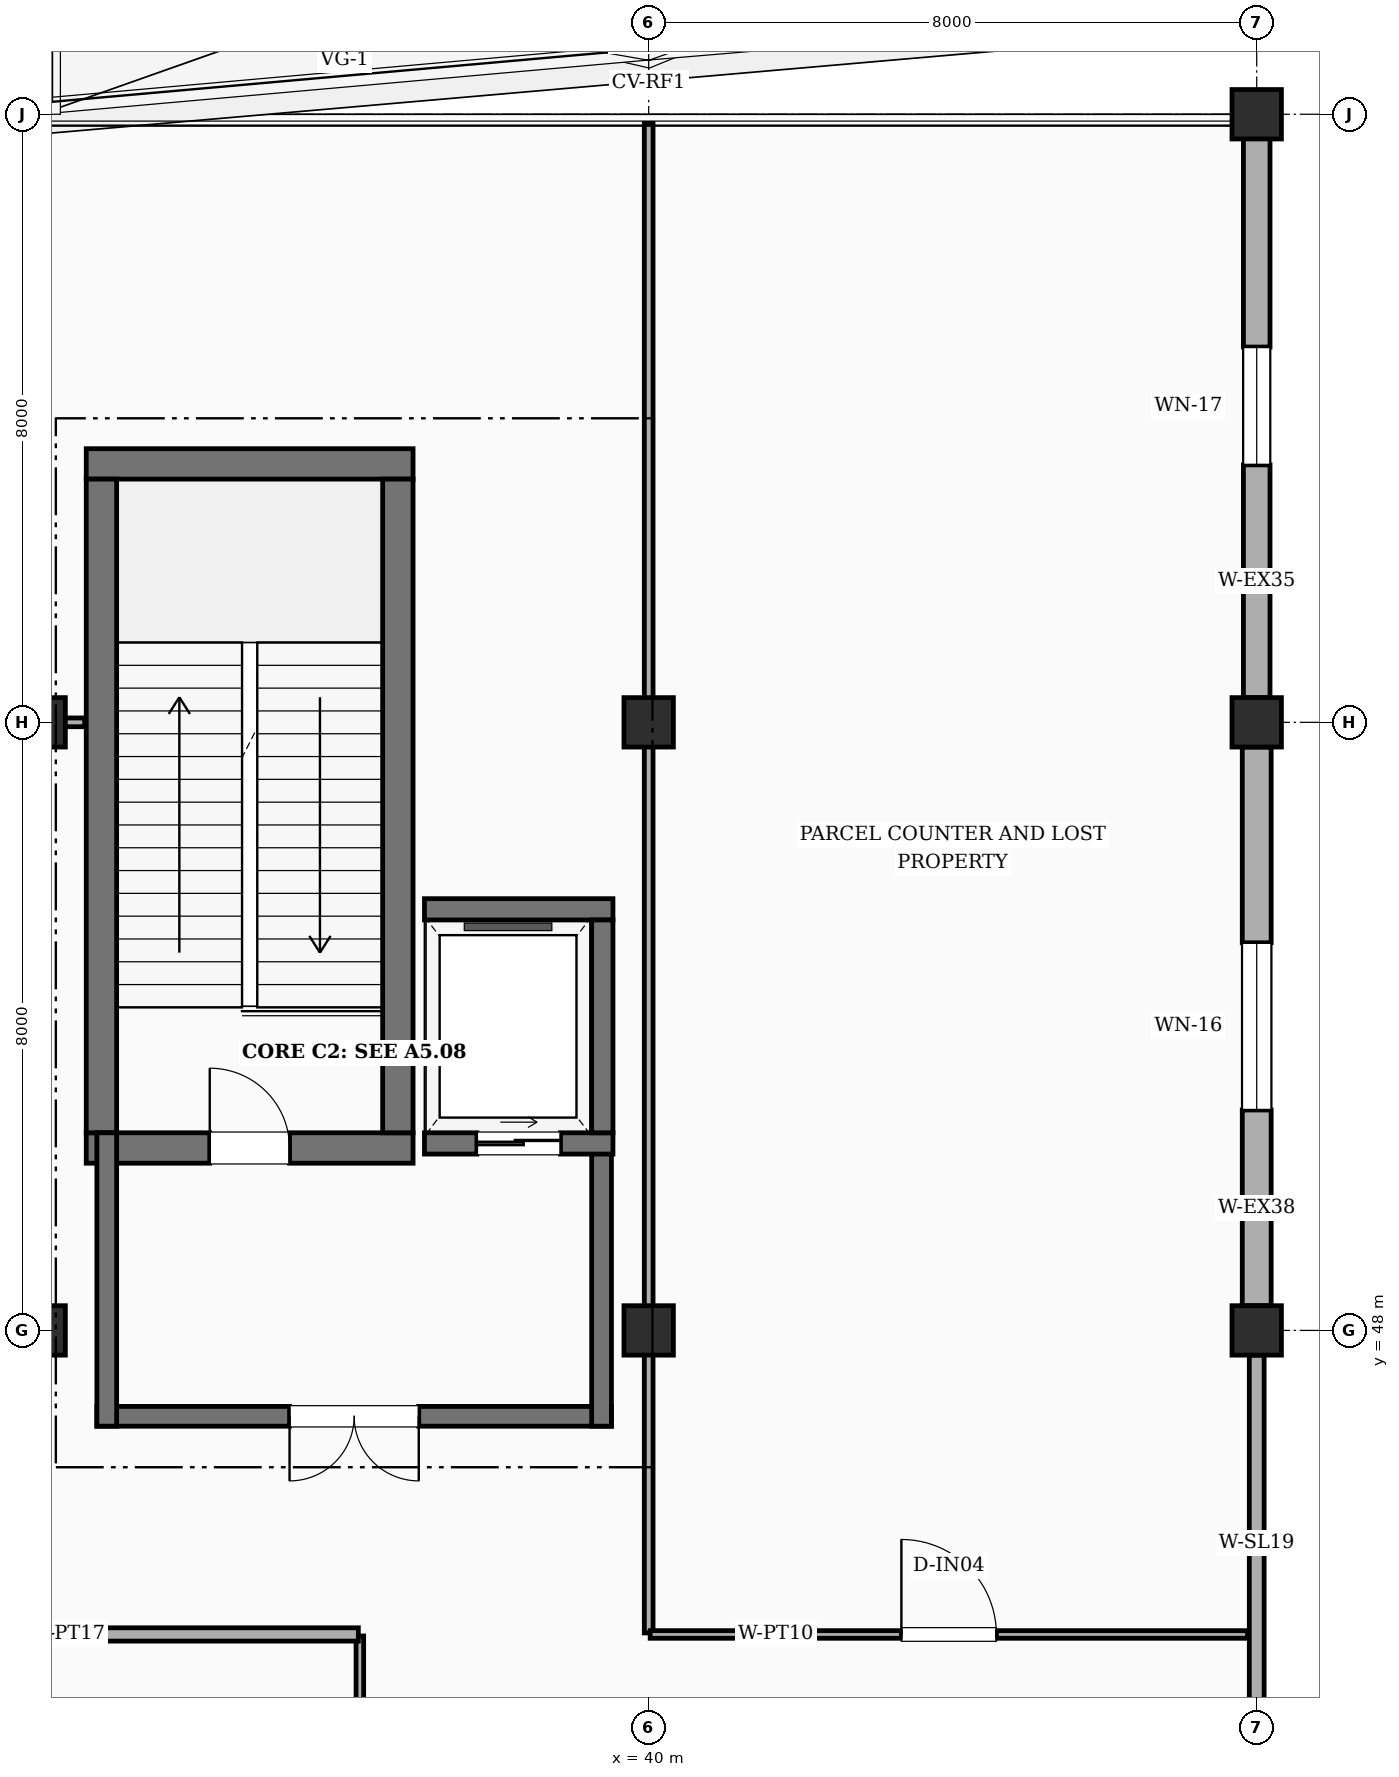
"""IFC4 building model, lengths in metres.
Left out: names, types, materials, properties, quantities, classifications, styles, units other than length and angle.
Written with IfcOpenShell. Run it as: python <this file> out.ifc"""

import sys

from ifc_helpers import new_model, si_unit, direction, frame, frame_2d, origin, origin_2d, place, context, subcontext, project, spatial, rectangle, extrude, element, fill, save


model = new_model("IFC4")
c1 = context("Model", 3, precision=1e-05, world=origin(), true_north=direction((0.0, 1.0)))
c2 = subcontext(c1, "Body", "Model", "MODEL_VIEW")
j1 = project(units=[si_unit("LENGTHUNIT", "METRE"), si_unit("PLANEANGLEUNIT", "RADIAN")], contexts=[c1])
p1 = place(None, origin())
s1 = spatial("IfcSite", under=j1, at=p1, CompositionType="ELEMENT")
p2 = place(p1, origin())
s2 = spatial("IfcBuilding", under=s1, at=p2, CompositionType="ELEMENT")
p3 = place(p2, frame((0.0, 0.0, 10.8)))
s3 = spatial("IfcBuildingStorey", under=s2, at=p3, CompositionType="ELEMENT", Elevation=10.8)
for number, where, z_axis, x_axis in (
    (1, (32.0, 48.0, 0.0), (0.0, 0.0, 1.0), (1.0, 0.0, 0.0)),
    (2, (32.0, 56.0, 0.0), (0.0, 0.0, 1.0), (1.0, 0.0, 0.0)),
    (3, (40.0, 48.0, 0.0), (0.0, 0.0, 1.0), (1.0, 0.0, 0.0)),
    (4, (40.0, 56.0, 0.0), (0.0, 0.0, 1.0), (1.0, 0.0, 0.0)),
    (5, (48.0, 48.0, 0.0), (0.0, 0.0, 1.0), (1.0, 0.0, 0.0)),
    (6, (48.0, 56.0, 0.0), (0.0, 0.0, 1.0), (1.0, 0.0, 0.0)),
    (7, (48.0, 64.0, 0.0), (0.0, 0.0, 1.0), (1.0, 0.0, 0.0)),
):
    element("IfcColumn", number, at=place(p3, frame(where, z_axis=z_axis, x_axis=x_axis)), inside=s3, PredefinedType="COLUMN", context=c2, shape_type="SweptSolid", body=[
        extrude(rectangle(XDim=0.65, YDim=0.65, at=origin_2d()), origin(), (0.0, 0.0, 1.0), 4.2),
    ])
p4 = place(p3, frame((48.0, 40.325, 0.0), z_axis=(0.0, 0.0, 1.0), x_axis=(0.0, 1.0, 0.0)))
e8 = element("IfcWall", 8, at=p4, inside=s3, PredefinedType="SOLIDWALL", context=c2, shape_type="SweptSolid", body=[
    extrude(rectangle(XDim=7.35, YDim=0.195, at=frame_2d((3.675, 0.0))), origin(), (0.0, 0.0, 1.0), 3.36),
])
p5 = place(p4, frame((0.85, 0.0, 0.95)))
e9 = element("IfcOpeningElement", 9, at=p5, cuts=e8, PredefinedType="OPENING", context=c2, shape_type="SweptSolid", body=[
    extrude(rectangle(XDim=1.55, YDim=1.75, at=frame_2d((0.775, 0.875))), frame((0.0, 0.107, 0.0), z_axis=(0.0, -1.0, 0.0), x_axis=(1.0, 0.0, 0.0)), (0.0, 0.0, 1.0), 0.215),
])
p6 = place(p3, frame((48.0, 48.325, 0.0), z_axis=(0.0, 0.0, 1.0), x_axis=(0.0, 1.0, 0.0)))
e10 = element("IfcWall", 10, at=p6, inside=s3, PredefinedType="STANDARD", context=c2, shape_type="SweptSolid", body=[
    extrude(rectangle(XDim=7.35, YDim=0.38, at=frame_2d((3.675, 0.0))), origin(), (0.0, 0.0, 1.0), 3.36),
])
p7 = place(p6, frame((2.575, 0.0, 0.95)))
e11 = element("IfcOpeningElement", 11, at=p7, cuts=e10, PredefinedType="OPENING", context=c2, shape_type="SweptSolid", body=[
    extrude(rectangle(XDim=2.2, YDim=1.75, at=frame_2d((1.1, 0.875))), frame((0.0, 0.2, 0.0), z_axis=(0.0, -1.0, 0.0), x_axis=(1.0, 0.0, 0.0)), (0.0, 0.0, 1.0), 0.4),
])
p8 = place(p3, frame((48.0, 56.325, 0.0), z_axis=(0.0, 0.0, 1.0), x_axis=(0.0, 1.0, 0.0)))
e12 = element("IfcWall", 12, at=p8, inside=s3, PredefinedType="STANDARD", context=c2, shape_type="SweptSolid", body=[
    extrude(rectangle(XDim=7.675, YDim=0.35, at=frame_2d((3.837, 0.0))), origin(), (0.0, 0.0, 1.0), 3.88),
])
p9 = place(p8, frame((3.062, 0.0, 0.95)))
e13 = element("IfcOpeningElement", 13, at=p9, cuts=e12, PredefinedType="OPENING", context=c2, shape_type="SweptSolid", body=[
    extrude(rectangle(XDim=1.55, YDim=1.75, at=frame_2d((0.775, 0.875))), frame((0.0, 0.185, 0.0), z_axis=(0.0, -1.0, 0.0), x_axis=(1.0, 0.0, 0.0)), (0.0, 0.0, 1.0), 0.37),
])
p10 = place(p3, frame((32.6, 50.4, 0.0), z_axis=(0.0, 0.0, 1.0), x_axis=(1.0, 0.0, 0.0)))
e14 = element("IfcWall", 14, at=p10, inside=s3, PredefinedType="SHEAR", context=c2, shape_type="SweptSolid", body=[
    extrude(rectangle(XDim=4.3, YDim=0.4, at=frame_2d((2.15, 0.0))), origin(), (0.0, 0.0, 1.0), 4.2),
])
p11 = place(p10, frame((1.625, 0.0, 0.0)))
e15 = element("IfcOpeningElement", 15, at=p11, cuts=e14, PredefinedType="OPENING", context=c2, shape_type="SweptSolid", body=[
    extrude(rectangle(XDim=1.05, YDim=2.15, at=frame_2d((0.525, 1.075))), frame((0.0, 0.21, 0.0), z_axis=(0.0, -1.0, 0.0), x_axis=(1.0, 0.0, 0.0)), (0.0, 0.0, 1.0), 0.42),
])
p12 = place(p3, frame((32.6, 59.4, 0.0), z_axis=(0.0, 0.0, 1.0), x_axis=(1.0, 0.0, 0.0)))
e16 = element("IfcWall", 16, at=p12, inside=s3, PredefinedType="SHEAR", context=c2, shape_type="SweptSolid", body=[
    extrude(rectangle(XDim=4.3, YDim=0.4, at=frame_2d((2.15, 0.0))), origin(), (0.0, 0.0, 1.0), 4.2),
])
for number, where, z_axis, x_axis in (
    (17, (32.8, 50.6, 0.0), (0.0, 0.0, 1.0), (0.0, 1.0, 0.0)),
    (18, (36.7, 50.6, 0.0), (0.0, 0.0, 1.0), (0.0, 1.0, 0.0)),
):
    element("IfcWall", number, at=place(p3, frame(where, z_axis=z_axis, x_axis=x_axis)), inside=s3, PredefinedType="SHEAR", context=c2, shape_type="SweptSolid", body=[
        extrude(rectangle(XDim=8.6, YDim=0.4, at=frame_2d((4.3, 0.0))), origin(), (0.0, 0.0, 1.0), 4.2),
    ])
p13 = place(p3, frame((39.51, 46.87, 0.0), z_axis=(0.0, 0.0, 1.0), x_axis=(-1.0, 0.0, 0.0)))
e19 = element("IfcWall", 19, at=p13, inside=s3, PredefinedType="SHEAR", context=c2, shape_type="SweptSolid", body=[
    extrude(rectangle(XDim=6.77, YDim=0.26, at=frame_2d((3.385, 0.0))), origin(), (0.0, 0.0, 1.0), 4.2),
])
p14 = place(p13, frame((2.535, 0.0, 0.0)))
e20 = element("IfcOpeningElement", 20, at=p14, cuts=e19, PredefinedType="OPENING", context=c2, shape_type="SweptSolid", body=[
    extrude(rectangle(XDim=1.7, YDim=2.2, at=frame_2d((0.85, 1.1))), frame((0.0, 0.14, 0.0), z_axis=(0.0, -1.0, 0.0), x_axis=(1.0, 0.0, 0.0)), (0.0, 0.0, 1.0), 0.28),
])
for number, where, z_axis, x_axis in (
    (21, (32.87, 46.74, 0.0), (0.0, 0.0, 1.0), (0.0, 1.0, 0.0)),
    (22, (39.38, 46.74, 0.0), (0.0, 0.0, 1.0), (0.0, 1.0, 0.0)),
):
    element("IfcWall", number, at=place(p3, frame(where, z_axis=z_axis, x_axis=x_axis)), inside=s3, PredefinedType="SHEAR", context=c2, shape_type="SweptSolid", body=[
        extrude(rectangle(XDim=3.86, YDim=0.26, at=frame_2d((1.93, 0.0))), origin(), (0.0, 0.0, 1.0), 4.2),
    ])
p15 = place(p3, frame((37.05, 50.46, 0.0), z_axis=(0.0, 0.0, 1.0), x_axis=(1.0, 0.0, 0.0)))
e23 = element("IfcWall", 23, at=p15, inside=s3, PredefinedType="SHEAR", context=c2, shape_type="SweptSolid", body=[
    extrude(rectangle(XDim=2.48, YDim=0.28, at=frame_2d((1.24, 0.0))), origin(), (0.0, 0.0, 1.0), 4.2),
])
p16 = place(p15, frame((0.69, 0.0, 0.0)))
e24 = element("IfcOpeningElement", 24, at=p16, cuts=e23, PredefinedType="OPENING", context=c2, shape_type="SweptSolid", body=[
    extrude(rectangle(XDim=1.1, YDim=2.15, at=frame_2d((0.55, 1.075))), frame((0.0, 0.15, 0.0), z_axis=(0.0, -1.0, 0.0), x_axis=(1.0, 0.0, 0.0)), (0.0, 0.0, 1.0), 0.3),
])
p17 = place(p3, frame((37.05, 53.54, 0.0), z_axis=(0.0, 0.0, 1.0), x_axis=(1.0, 0.0, 0.0)))
e25 = element("IfcWall", 25, at=p17, inside=s3, PredefinedType="SHEAR", context=c2, shape_type="SweptSolid", body=[
    extrude(rectangle(XDim=2.48, YDim=0.28, at=frame_2d((1.24, 0.0))), origin(), (0.0, 0.0, 1.0), 4.2),
])
p18 = place(p3, frame((39.39, 50.6, 0.0), z_axis=(0.0, 0.0, 1.0), x_axis=(0.0, 1.0, 0.0)))
e26 = element("IfcWall", 26, at=p18, inside=s3, PredefinedType="SHEAR", context=c2, shape_type="SweptSolid", body=[
    extrude(rectangle(XDim=2.8, YDim=0.28, at=frame_2d((1.4, 0.0))), origin(), (0.0, 0.0, 1.0), 4.2),
])
p19 = place(p3, frame((24.12, 56.0, 0.0), z_axis=(0.0, 0.0, 1.0), x_axis=(1.0, 0.0, 0.0)))
e27 = element("IfcWall", 27, at=p19, inside=s3, PredefinedType="PARTITIONING", context=c2, shape_type="SweptSolid", body=[
    extrude(rectangle(XDim=8.46, YDim=0.115, at=frame_2d((4.23, 0.0))), origin(), (0.0, 0.0, 1.0), 3.464),
])
p20 = place(p3, frame((36.2, 15.02, 0.0), z_axis=(0.0, 0.0, 1.0), x_axis=(0.0, 1.0, 0.0)))
e28 = element("IfcWall", 28, at=p20, inside=s3, PredefinedType="PARTITIONING", context=c2, shape_type="SweptSolid", body=[
    extrude(rectangle(XDim=28.96, YDim=0.1, at=frame_2d((14.48, 0.0))), origin(), (0.0, 0.0, 1.0), 3.88),
])
p21 = place(p20, frame((13.755, 0.0, 0.0)))
e29 = element("IfcOpeningElement", 29, at=p21, cuts=e28, PredefinedType="OPENING", context=c2, shape_type="SweptSolid", body=[
    extrude(rectangle(XDim=1.45, YDim=2.2, at=frame_2d((0.725, 1.1))), frame((0.0, 0.06, 0.0), z_axis=(0.0, -1.0, 0.0), x_axis=(1.0, 0.0, 0.0)), (0.0, 0.0, 1.0), 0.12),
])
p22 = place(p3, frame((28.52, 44.0, 0.0), z_axis=(0.0, 0.0, 1.0), x_axis=(1.0, 0.0, 0.0)))
e30 = element("IfcWall", 30, at=p22, inside=s3, PredefinedType="PARTITIONING", context=c2, shape_type="SweptSolid", body=[
    extrude(rectangle(XDim=7.66, YDim=0.175, at=frame_2d((3.83, 0.0))), origin(), (0.0, 0.0, 1.0), 3.36),
])
p23 = place(p3, frame((40.0, 44.02, 0.0), z_axis=(0.0, 0.0, 1.0), x_axis=(0.0, 1.0, 0.0)))
e31 = element("IfcWall", 31, at=p23, inside=s3, PredefinedType="PARTITIONING", context=c2, shape_type="SweptSolid", body=[
    extrude(rectangle(XDim=19.86, YDim=0.115, at=frame_2d((9.93, 0.0))), origin(), (0.0, 0.0, 1.0), 3.36),
])
p24 = place(p3, frame((40.02, 44.0, 0.0), z_axis=(0.0, 0.0, 1.0), x_axis=(1.0, 0.0, 0.0)))
e32 = element("IfcWall", 32, at=p24, inside=s3, PredefinedType="PARTITIONING", context=c2, shape_type="SweptSolid", body=[
    extrude(rectangle(XDim=7.86, YDim=0.1, at=frame_2d((3.93, 0.0))), origin(), (0.0, 0.0, 1.0), 3.36),
])
p25 = place(p24, frame((3.305, 0.0, 0.0)))
e33 = element("IfcOpeningElement", 33, at=p25, cuts=e32, PredefinedType="OPENING", context=c2, shape_type="SweptSolid", body=[
    extrude(rectangle(XDim=1.25, YDim=2.15, at=frame_2d((0.625, 1.075))), frame((0.0, 0.06, 0.0), z_axis=(0.0, -1.0, 0.0), x_axis=(1.0, 0.0, 0.0)), (0.0, 0.0, 1.0), 0.12),
])
p26 = place(p7, origin())
e34 = element("IfcWindow", 34, at=p26, inside=s3, PartitioningType="SINGLE_PANEL", PredefinedType="WINDOW", context=c2, shape_type="SweptSolid", body=[
    extrude(rectangle(XDim=2.2, YDim=1.75, at=frame_2d((1.1, 0.875))), frame((0.0, 0.03, 0.0), z_axis=(0.0, -1.0, 0.0), x_axis=(1.0, 0.0, 0.0)), (0.0, 0.0, 1.0), 0.06),
])
fill(e11, e34)
p27 = place(p9, origin())
e35 = element("IfcWindow", 35, at=p27, inside=s3, PartitioningType="SINGLE_PANEL", PredefinedType="WINDOW", context=c2, shape_type="SweptSolid", body=[
    extrude(rectangle(XDim=1.55, YDim=1.75, at=frame_2d((0.775, 0.875))), frame((0.0, 0.03, 0.0), z_axis=(0.0, -1.0, 0.0), x_axis=(1.0, 0.0, 0.0)), (0.0, 0.0, 1.0), 0.06),
])
fill(e13, e35)
p28 = place(p11, origin())
e36 = element("IfcDoor", 36, at=p28, inside=s3, OperationType="SINGLE_SWING_LEFT", PredefinedType="DOOR", context=c2, shape_type="SweptSolid", body=[
    extrude(rectangle(XDim=1.05, YDim=2.15, at=frame_2d((0.525, 1.075))), frame((0.0, 0.025, 0.0), z_axis=(0.0, -1.0, 0.0), x_axis=(1.0, 0.0, 0.0)), (0.0, 0.0, 1.0), 0.05),
])
fill(e15, e36)
p29 = place(p14, origin())
e37 = element("IfcDoor", 37, at=p29, inside=s3, OperationType="DOUBLE_DOOR_SINGLE_SWING", PredefinedType="DOOR", context=c2, shape_type="SweptSolid", body=[
    extrude(rectangle(XDim=1.7, YDim=2.2, at=frame_2d((0.85, 1.1))), frame((0.0, 0.025, 0.0), z_axis=(0.0, -1.0, 0.0), x_axis=(1.0, 0.0, 0.0)), (0.0, 0.0, 1.0), 0.05),
])
fill(e20, e37)
p30 = place(p16, origin())
e38 = element("IfcDoor", 38, at=p30, inside=s3, OperationType="SLIDING_TO_LEFT", PredefinedType="DOOR", context=c2, shape_type="SweptSolid", body=[
    extrude(rectangle(XDim=1.1, YDim=2.15, at=frame_2d((0.55, 1.075))), frame((0.0, 0.025, 0.0), z_axis=(0.0, -1.0, 0.0), x_axis=(1.0, 0.0, 0.0)), (0.0, 0.0, 1.0), 0.05),
])
fill(e24, e38)
p31 = place(p25, origin())
e39 = element("IfcDoor", 39, at=p31, inside=s3, OperationType="SINGLE_SWING_LEFT", PredefinedType="DOOR", context=c2, shape_type="SweptSolid", body=[
    extrude(rectangle(XDim=1.25, YDim=2.15, at=frame_2d((0.625, 1.075))), frame((0.0, 0.025, 0.0), z_axis=(0.0, -1.0, 0.0), x_axis=(1.0, 0.0, 0.0)), (0.0, 0.0, 1.0), 0.05),
])
fill(e33, e39)
save(model, sys.argv[1])
